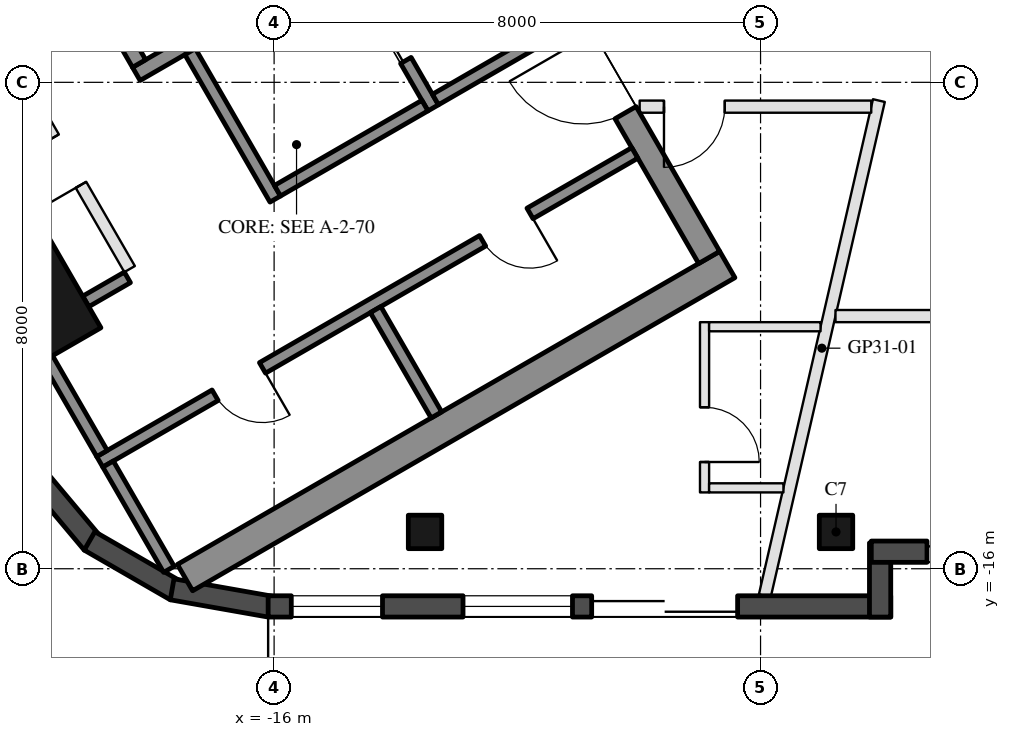
"""IFC4 building model, lengths in metres.
Left out: names, types, materials, properties, quantities, classifications, styles, units other than length and angle.
Written with IfcOpenShell. Run it as: python <this file> out.ifc"""

import sys

from ifc_helpers import new_model, si_unit, direction, frame, frame_2d, origin, origin_2d, place, context, subcontext, project, spatial, rectangle, hollow_rectangle, extrude, boolean, halfspace, element, fill, save


model = new_model("IFC4")
c1 = context("Model", 3, precision=1e-05, world=origin(), true_north=direction((0.0, 1.0)))
c2 = subcontext(c1, "Body", "Model", "MODEL_VIEW")
j1 = project(units=[si_unit("LENGTHUNIT", "METRE"), si_unit("PLANEANGLEUNIT", "RADIAN")], contexts=[c1])
p1 = place(None, origin())
s1 = spatial("IfcSite", under=j1, at=p1, CompositionType="ELEMENT")
p2 = place(p1, origin())
s2 = spatial("IfcBuilding", under=s1, at=p2, CompositionType="ELEMENT")
p3 = place(p2, frame((0.0, 0.0, 302.2)))
s3 = spatial("IfcBuildingStorey", under=s2, at=p3, CompositionType="ELEMENT", Elevation=302.2)
p4 = place(p3, frame((-13.518, -15.395, 0.0), z_axis=(0.0, 0.0, 1.0), x_axis=(-1.0, 0.0, 0.0)))
e1 = element("IfcColumn", 1, at=p4, inside=s3, PredefinedType="COLUMN", context=c2, shape_type="SweptSolid", body=[
    boolean("DIFFERENCE", extrude(hollow_rectangle(XDim=0.55, YDim=0.55, WallThickness=0.025, at=origin_2d()), origin(), (0.0, 0.0, 1.0), 3.7), halfspace(frame((0.0, 0.0, 0.04), z_axis=(0.0, 0.0, 1.0), x_axis=(1.0, 0.0, 0.0)), True)),
])
p5 = place(p3, frame((-6.759, -15.395, 0.0), z_axis=(0.0, 0.0, 1.0), x_axis=(-1.0, 0.0, 0.0)))
e2 = element("IfcColumn", 2, at=p5, inside=s3, PredefinedType="COLUMN", context=c2, shape_type="SweptSolid", body=[
    boolean("DIFFERENCE", extrude(hollow_rectangle(XDim=0.55, YDim=0.55, WallThickness=0.025, at=origin_2d()), origin(), (0.0, 0.0, 1.0), 3.7), halfspace(frame((0.0, 0.0, 0.034), z_axis=(0.0, 0.0, 1.0), x_axis=(1.0, 0.0, 0.0)), True)),
])
p6 = place(p3, frame((-20.214, -11.671, 0.0), z_axis=(0.0, 0.0, 1.0), x_axis=(-0.5, 0.866025403784, 0.0)))
e3 = element("IfcColumn", 3, at=p6, inside=s3, PredefinedType="COLUMN", context=c2, shape_type="SweptSolid", body=[
    boolean("DIFFERENCE", extrude(hollow_rectangle(XDim=2.0, YDim=2.0, WallThickness=0.05, at=origin_2d()), origin(), (0.0, 0.0, 1.0), 3.7), halfspace(frame((0.0, 0.0, 0.113), z_axis=(0.0, 0.0, 1.0), x_axis=(1.0, 0.0, 0.0)), True)),
])
p7 = place(p3, frame((-20.039, -14.329, 0.0), z_axis=(0.0, 0.0, 1.0), x_axis=(0.642708448155, -0.766110860562, 0.0)))
e4 = element("IfcWall", 4, at=p7, inside=s3, PredefinedType="SOLIDWALL", context=c2, shape_type="SweptSolid", body=[
    extrude(rectangle(XDim=1.634, YDim=0.35, at=frame_2d((0.817, 0.0))), origin(), (0.0, 0.0, 1.0), 3.55),
])
p8 = place(p3, frame((-19.035, -15.542, 0.0), z_axis=(0.0, 0.0, 1.0), x_axis=(0.866083589932, -0.499899205091, 0.0)))
e5 = element("IfcWall", 5, at=p8, inside=s3, PredefinedType="SOLIDWALL", context=c2, shape_type="SweptSolid", body=[
    extrude(rectangle(XDim=1.634, YDim=0.35, at=frame_2d((0.817, 0.0))), origin(), (0.0, 0.0, 1.0), 3.55),
])
p9 = place(p3, frame((-17.677, -16.338, 0.0), z_axis=(0.0, 0.0, 1.0), x_axis=(0.98479107762, -0.173742721977, 0.0)))
e6 = element("IfcWall", 6, at=p9, inside=s3, PredefinedType="SOLIDWALL", context=c2, shape_type="SweptSolid", body=[
    extrude(rectangle(XDim=1.634, YDim=0.35, at=frame_2d((0.817, 0.0))), origin(), (0.0, 0.0, 1.0), 3.55),
])
p10 = place(p3, frame((-16.098, -16.62, 0.0), z_axis=(0.0, 0.0, 1.0), x_axis=(1.0, 0.0, 0.0)))
e7 = element("IfcWall", 7, at=p10, inside=s3, PredefinedType="SOLIDWALL", context=c2, shape_type="SweptSolid", body=[
    extrude(rectangle(XDim=10.239, YDim=0.35, at=frame_2d((5.12, 0.0))), origin(), (0.0, 0.0, 1.0), 3.55),
])
p11 = place(p10, frame((0.381, 0.0, 0.3)))
e8 = element("IfcOpeningElement", 8, at=p11, cuts=e7, PredefinedType="OPENING", context=c2, shape_type="SweptSolid", body=[
    extrude(rectangle(XDim=1.5, YDim=2.65, at=frame_2d((0.75, 1.325))), frame((0.0, 0.185, 0.0), z_axis=(0.0, -1.0, 0.0), x_axis=(1.0, 0.0, 0.0)), (0.0, 0.0, 1.0), 0.37),
])
p12 = place(p10, frame((5.321, 0.0, 0.0)))
e9 = element("IfcOpeningElement", 9, at=p12, cuts=e7, PredefinedType="OPENING", context=c2, shape_type="SweptSolid", body=[
    extrude(rectangle(XDim=2.4, YDim=2.4, at=frame_2d((1.2, 1.2))), frame((0.0, 0.185, 0.0), z_axis=(0.0, -1.0, 0.0), x_axis=(1.0, 0.0, 0.0)), (0.0, 0.0, 1.0), 0.37),
])
p13 = place(p10, frame((3.205, 0.0, 0.3)))
e10 = element("IfcOpeningElement", 10, at=p13, cuts=e7, PredefinedType="OPENING", context=c2, shape_type="SweptSolid", body=[
    extrude(rectangle(XDim=1.8, YDim=2.65, at=frame_2d((0.9, 1.325))), frame((0.0, 0.185, 0.0), z_axis=(0.0, -1.0, 0.0), x_axis=(1.0, 0.0, 0.0)), (0.0, 0.0, 1.0), 0.37),
])
p14 = place(p3, frame((-6.034, -16.795, 0.0), z_axis=(0.0, 0.0, 1.0), x_axis=(0.0, 1.0, 0.0)))
e11 = element("IfcWall", 11, at=p14, inside=s3, PredefinedType="SOLIDWALL", context=c2, shape_type="SweptSolid", body=[
    extrude(rectangle(XDim=1.22, YDim=0.35, at=frame_2d((0.61, 0.0))), origin(), (0.0, 0.0, 1.0), 3.55),
])
p15 = place(p3, frame((-6.179, -15.719, 0.0), z_axis=(0.0, 0.0, 1.0), x_axis=(1.0, 0.0, 0.0)))
e12 = element("IfcWall", 12, at=p15, inside=s3, PredefinedType="SOLIDWALL", context=c2, shape_type="SweptSolid", body=[
    extrude(rectangle(XDim=5.599, YDim=0.35, at=frame_2d((2.799, 0.0))), origin(), (0.0, 0.0, 1.0), 3.55),
])
p16 = place(p15, frame((0.916, 0.0, 0.0)))
e13 = element("IfcOpeningElement", 13, at=p16, cuts=e12, PredefinedType="OPENING", context=c2, shape_type="SweptSolid", body=[
    extrude(rectangle(XDim=2.4, YDim=2.4, at=frame_2d((1.2, 1.2))), frame((0.0, 0.185, 0.0), z_axis=(0.0, -1.0, 0.0), x_axis=(1.0, 0.0, 0.0)), (0.0, 0.0, 1.0), 0.37),
])
p17 = place(p3, frame((-8.547, -10.997, 0.0), z_axis=(0.0, 0.0, 1.0), x_axis=(-0.866027279078, -0.499996751883, 0.0)))
e14 = element("IfcWall", 14, at=p17, inside=s3, PredefinedType="SHEAR", context=c2, shape_type="SweptSolid", body=[
    extrude(rectangle(XDim=10.298, YDim=0.5, at=frame_2d((5.149, 0.0))), origin(), (0.0, 0.0, 1.0), 3.5),
])
p18 = place(p3, frame((-13.845, -2.22, 0.0), z_axis=(0.0, 0.0, 1.0), x_axis=(0.500004234368, -0.866022959057, 0.0)))
e15 = element("IfcWall", 15, at=p18, inside=s3, PredefinedType="SHEAR", context=c2, shape_type="SweptSolid", body=[
    extrude(rectangle(XDim=10.0, YDim=0.4, at=frame_2d((5.0, 0.0))), origin(), (0.0, 0.0, 1.0), 3.5),
])
p19 = place(p18, frame((3.55, 0.0, 0.0)))
e16 = element("IfcOpeningElement", 16, at=p19, cuts=e15, PredefinedType="OPENING", context=c2, shape_type="SweptSolid", body=[
    extrude(rectangle(XDim=1.1, YDim=2.1, at=frame_2d((0.55, 1.05))), frame((0.0, 0.21, 0.0), z_axis=(0.0, -1.0, 0.0), x_axis=(1.0, 0.0, 0.0)), (0.0, 0.0, 1.0), 0.42),
])
p20 = place(p18, frame((5.85, 0.0, 0.0)))
e17 = element("IfcOpeningElement", 17, at=p20, cuts=e15, PredefinedType="OPENING", context=c2, shape_type="SweptSolid", body=[
    extrude(rectangle(XDim=1.4, YDim=2.1, at=frame_2d((0.7, 1.05))), frame((0.0, 0.21, 0.0), z_axis=(0.0, -1.0, 0.0), x_axis=(1.0, 0.0, 0.0)), (0.0, 0.0, 1.0), 0.42),
])
p21 = place(p3, frame((-12.681, -4.636, 0.0), z_axis=(0.0, 0.0, 1.0), x_axis=(-0.866021702275, -0.500006411147, 0.0)))
e18 = element("IfcWall", 18, at=p21, inside=s3, PredefinedType="SHEAR", context=c2, shape_type="SweptSolid", body=[
    extrude(rectangle(XDim=6.45, YDim=0.25, at=frame_2d((3.225, 0.0))), origin(), (0.0, 0.0, 1.0), 3.5),
])
p22 = place(p21, frame((0.3, 0.0, 0.0)))
e19 = element("IfcOpeningElement", 19, at=p22, cuts=e18, PredefinedType="OPENING", context=c2, shape_type="SweptSolid", body=[
    extrude(rectangle(XDim=1.0, YDim=2.1, at=frame_2d((0.5, 1.05))), frame((0.0, 0.135, 0.0), z_axis=(0.0, -1.0, 0.0), x_axis=(1.0, 0.0, 0.0)), (0.0, 0.0, 1.0), 0.27),
])
p23 = place(p3, frame((-19.496, -5.482, 0.0), z_axis=(0.0, 0.0, 1.0), x_axis=(0.499990435942, -0.866030925526, 0.0)))
e20 = element("IfcWall", 20, at=p23, inside=s3, PredefinedType="SHEAR", context=c2, shape_type="SweptSolid", body=[
    extrude(rectangle(XDim=2.55, YDim=0.25, at=frame_2d((1.275, 0.0))), origin(), (0.0, 0.0, 1.0), 3.5),
])
p24 = place(p3, frame((-17.381, -7.495, 0.0), z_axis=(0.0, 0.0, 1.0), x_axis=(0.500011755427, -0.866018616679, 0.0)))
e21 = element("IfcWall", 21, at=p24, inside=s3, PredefinedType="SHEAR", context=c2, shape_type="SweptSolid", body=[
    extrude(rectangle(XDim=2.8, YDim=0.2, at=frame_2d((1.4, 0.0))), origin(), (0.0, 0.0, 1.0), 3.5),
])
p25 = place(p3, frame((-14.783, -5.995, 0.0), z_axis=(0.0, 0.0, 1.0), x_axis=(0.49994636267, -0.866056369097, 0.0)))
e22 = element("IfcWall", 22, at=p25, inside=s3, PredefinedType="SHEAR", context=c2, shape_type="SweptSolid", body=[
    extrude(rectangle(XDim=2.8, YDim=0.2, at=frame_2d((1.4, 0.0))), origin(), (0.0, 0.0, 1.0), 3.5),
])
p26 = place(p25, frame((0.7, 0.0, 0.0)))
e23 = element("IfcOpeningElement", 23, at=p26, cuts=e22, PredefinedType="OPENING", context=c2, shape_type="SweptSolid", body=[
    extrude(rectangle(XDim=1.2, YDim=2.1, at=frame_2d((0.6, 1.05))), frame((0.0, 0.11, 0.0), z_axis=(0.0, -1.0, 0.0), x_axis=(1.0, 0.0, 0.0)), (0.0, 0.0, 1.0), 0.22),
])
p27 = place(p3, frame((-13.52, -8.383, 0.0), z_axis=(0.0, 0.0, 1.0), x_axis=(-0.866034573852, -0.49998411664, 0.0)))
e24 = element("IfcWall", 24, at=p27, inside=s3, PredefinedType="SHEAR", context=c2, shape_type="SweptSolid", body=[
    extrude(rectangle(XDim=2.8, YDim=0.2, at=frame_2d((1.4, 0.0))), origin(), (0.0, 0.0, 1.0), 3.5),
])
p28 = place(p3, frame((-11.268, -7.083, 0.0), z_axis=(0.0, 0.0, 1.0), x_axis=(-0.866050077142, -0.499957262057, 0.0)))
e25 = element("IfcWall", 25, at=p28, inside=s3, PredefinedType="SHEAR", context=c2, shape_type="SweptSolid", body=[
    extrude(rectangle(XDim=2.4, YDim=0.2, at=frame_2d((1.2, 0.0))), origin(), (0.0, 0.0, 1.0), 3.5),
])
p29 = place(p3, frame((-10.068, -9.162, 0.0), z_axis=(0.0, 0.0, 1.0), x_axis=(-0.866032725843, -0.499987317609, 0.0)))
e26 = element("IfcWall", 26, at=p29, inside=s3, PredefinedType="SHEAR", context=c2, shape_type="SweptSolid", body=[
    extrude(rectangle(XDim=10.16, YDim=0.2, at=frame_2d((5.08, 0.0))), origin(), (0.0, 0.0, 1.0), 3.5),
])
p30 = place(p29, frame((1.99, 0.0, 0.0)))
e27 = element("IfcOpeningElement", 27, at=p30, cuts=e26, PredefinedType="OPENING", context=c2, shape_type="SweptSolid", body=[
    extrude(rectangle(XDim=0.9, YDim=2.1, at=frame_2d((0.45, 1.05))), frame((0.0, 0.11, 0.0), z_axis=(0.0, -1.0, 0.0), x_axis=(1.0, 0.0, 0.0)), (0.0, 0.0, 1.0), 0.22),
])
p31 = place(p29, frame((7.07, 0.0, 0.0)))
e28 = element("IfcOpeningElement", 28, at=p31, cuts=e26, PredefinedType="OPENING", context=c2, shape_type="SweptSolid", body=[
    extrude(rectangle(XDim=0.9, YDim=2.1, at=frame_2d((0.45, 1.05))), frame((0.0, 0.11, 0.0), z_axis=(0.0, -1.0, 0.0), x_axis=(1.0, 0.0, 0.0)), (0.0, 0.0, 1.0), 0.22),
])
p32 = place(p3, frame((-19.73, -12.546, 0.0), z_axis=(0.0, 0.0, 1.0), x_axis=(0.500004188491, -0.866022985545, 0.0)))
e29 = element("IfcWall", 29, at=p32, inside=s3, PredefinedType="SHEAR", context=c2, shape_type="SweptSolid", body=[
    extrude(rectangle(XDim=1.8, YDim=0.2, at=frame_2d((0.9, 0.0))), origin(), (0.0, 0.0, 1.0), 3.5),
])
p33 = place(p3, frame((-18.413, -11.208, 0.0), z_axis=(0.0, 0.0, 1.0), x_axis=(-0.86597493103, -0.500087411186, 0.0)))
e30 = element("IfcWall", 30, at=p33, inside=s3, PredefinedType="SHEAR", context=c2, shape_type="SweptSolid", body=[
    extrude(rectangle(XDim=0.791, YDim=0.2, at=frame_2d((0.396, 0.0))), origin(), (0.0, 0.0, 1.0), 3.5),
])
for number, where, z_axis, x_axis in (
    (31, (-14.331, -11.738, 0.0), (0.0, 0.0, 1.0), (0.5, -0.866, 0.0)),
    (32, (-18.73, -14.278, 0.0), (0.0, 0.0, 1.0), (0.5, -0.866, 0.0)),
):
    element("IfcWall", number, at=place(p3, frame(where, z_axis=z_axis, x_axis=x_axis)), inside=s3, PredefinedType="SHEAR", context=c2, shape_type="SweptSolid", body=[
        extrude(rectangle(XDim=2.0, YDim=0.2, at=frame_2d((1.0, 0.0))), origin(), (0.0, 0.0, 1.0), 3.5),
    ])
p34 = place(p3, frame((-21.076, -6.395, 0.0), z_axis=(0.0, 0.0, 1.0), x_axis=(0.50001468107, -0.866016927499, 0.0)))
e33 = element("IfcWall", 33, at=p34, inside=s3, PredefinedType="PARTITIONING", context=c2, shape_type="SweptSolid", body=[
    extrude(rectangle(XDim=5.4, YDim=0.2, at=frame_2d((2.7, 0.0))), origin(), (0.0, 0.0, 1.0), 3.5),
])
p35 = place(p34, frame((2.9, 0.0, 0.0)))
e34 = element("IfcOpeningElement", 34, at=p35, cuts=e33, PredefinedType="OPENING", context=c2, shape_type="SweptSolid", body=[
    extrude(rectangle(XDim=0.9, YDim=2.1, at=frame_2d((0.45, 1.05))), frame((0.0, 0.11, 0.0), z_axis=(0.0, -1.0, 0.0), x_axis=(1.0, 0.0, 0.0)), (0.0, 0.0, 1.0), 0.22),
])
p36 = place(p3, frame((-18.866, -6.822, 0.0), z_axis=(0.0, 0.0, 1.0), x_axis=(-0.866028054938, -0.499995408039, 0.0)))
e35 = element("IfcWall", 35, at=p36, inside=s3, PredefinedType="PARTITIONING", context=c2, shape_type="SweptSolid", body=[
    extrude(rectangle(XDim=1.6, YDim=0.15, at=frame_2d((0.8, 0.0))), origin(), (0.0, 0.0, 1.0), 3.5),
])
p37 = place(p36, frame((0.35, 0.0, 0.0)))
e36 = element("IfcOpeningElement", 36, at=p37, cuts=e35, PredefinedType="OPENING", context=c2, shape_type="SweptSolid", body=[
    extrude(rectangle(XDim=0.9, YDim=2.1, at=frame_2d((0.45, 1.05))), frame((0.0, 0.085, 0.0), z_axis=(0.0, -1.0, 0.0), x_axis=(1.0, 0.0, 0.0)), (0.0, 0.0, 1.0), 0.17),
])
p38 = place(p3, frame((-7.93, -16.445, 0.0), z_axis=(0.0, 0.0, 1.0), x_axis=(0.224458408835, 0.974483669798, 0.0)))
e37 = element("IfcWall", 37, at=p38, inside=s3, PredefinedType="PARTITIONING", context=c2, shape_type="SweptSolid", body=[
    extrude(rectangle(XDim=8.358, YDim=0.2, at=frame_2d((4.179, 0.0))), origin(), (0.0, 0.0, 1.0), 3.1),
])
p39 = place(p3, frame((-6.18, -8.4, 0.0), z_axis=(0.0, 0.0, 1.0), x_axis=(-1.0, 0.0, 0.0)))
e38 = element("IfcWall", 38, at=p39, inside=s3, PredefinedType="PARTITIONING", context=c2, shape_type="SweptSolid", body=[
    extrude(rectangle(XDim=3.809, YDim=0.2, at=frame_2d((1.904, 0.0))), origin(), (0.0, 0.0, 1.0), 3.1),
])
p40 = place(p39, frame((2.409, 0.0, 0.0)))
e39 = element("IfcOpeningElement", 39, at=p40, cuts=e38, PredefinedType="OPENING", context=c2, shape_type="SweptSolid", body=[
    extrude(rectangle(XDim=1.0, YDim=2.1, at=frame_2d((0.5, 1.05))), frame((0.0, 0.11, 0.0), z_axis=(0.0, -1.0, 0.0), x_axis=(1.0, 0.0, 0.0)), (0.0, 0.0, 1.0), 0.22),
])
p41 = place(p3, frame((-8.921, -11.945, 0.0), z_axis=(0.0, 0.0, 1.0), x_axis=(0.0, -1.0, 0.0)))
e40 = element("IfcWall", 40, at=p41, inside=s3, PredefinedType="PARTITIONING", context=c2, shape_type="SweptSolid", body=[
    extrude(rectangle(XDim=2.8, YDim=0.15, at=frame_2d((1.4, 0.0))), origin(), (0.0, 0.0, 1.0), 3.55),
])
p42 = place(p41, frame((1.4, 0.0, 0.0)))
e41 = element("IfcOpeningElement", 41, at=p42, cuts=e40, PredefinedType="OPENING", context=c2, shape_type="SweptSolid", body=[
    extrude(rectangle(XDim=0.9, YDim=2.1, at=frame_2d((0.45, 1.05))), frame((0.0, 0.085, 0.0), z_axis=(0.0, -1.0, 0.0), x_axis=(1.0, 0.0, 0.0)), (0.0, 0.0, 1.0), 0.17),
])
p43 = place(p3, frame((-8.846, -14.67, 0.0), z_axis=(0.0, 0.0, 1.0), x_axis=(1.0, 0.0, 0.0)))
e42 = element("IfcWall", 42, at=p43, inside=s3, PredefinedType="PARTITIONING", context=c2, shape_type="SweptSolid", body=[
    extrude(rectangle(XDim=1.222, YDim=0.15, at=frame_2d((0.611, 0.0))), origin(), (0.0, 0.0, 1.0), 3.55),
])
p44 = place(p3, frame((-8.846, -12.02, 0.0), z_axis=(0.0, 0.0, 1.0), x_axis=(1.0, 0.0, 0.0)))
e43 = element("IfcWall", 43, at=p44, inside=s3, PredefinedType="PARTITIONING", context=c2, shape_type="SweptSolid", body=[
    extrude(rectangle(XDim=1.833, YDim=0.15, at=frame_2d((0.917, 0.0))), origin(), (0.0, 0.0, 1.0), 3.55),
])
p45 = place(p3, frame((-2.226, -11.844, 0.0), z_axis=(0.0, 0.0, 1.0), x_axis=(-1.0, 0.0, 0.0)))
e44 = element("IfcWall", 44, at=p45, inside=s3, PredefinedType="PARTITIONING", context=c2, shape_type="SweptSolid", body=[
    extrude(rectangle(XDim=4.542, YDim=0.2, at=frame_2d((2.271, 0.0))), origin(), (0.0, 0.0, 1.0), 3.1),
])
p46 = place(p45, frame((1.771, 0.0, 0.0)))
e45 = element("IfcOpeningElement", 45, at=p46, cuts=e44, PredefinedType="OPENING", context=c2, shape_type="SweptSolid", body=[
    extrude(rectangle(XDim=1.0, YDim=2.1, at=frame_2d((0.5, 1.05))), frame((0.0, 0.11, 0.0), z_axis=(0.0, -1.0, 0.0), x_axis=(1.0, 0.0, 0.0)), (0.0, 0.0, 1.0), 0.22),
])
p47 = place(p11, origin())
e46 = element("IfcWindow", 46, at=p47, inside=s3, PartitioningType="SINGLE_PANEL", PredefinedType="WINDOW", context=c2, shape_type="SweptSolid", body=[
    extrude(rectangle(XDim=1.5, YDim=2.65, at=frame_2d((0.75, 1.325))), frame((0.0, 0.03, 0.0), z_axis=(0.0, -1.0, 0.0), x_axis=(1.0, 0.0, 0.0)), (0.0, 0.0, 1.0), 0.06),
])
fill(e8, e46)
p48 = place(p12, frame((2.4, 0.0, 0.0), z_axis=(0.0, 0.0, 1.0), x_axis=(-1.0, 0.0, 0.0)))
e47 = element("IfcDoor", 47, at=p48, inside=s3, OperationType="SLIDING_TO_LEFT", PredefinedType="DOOR", context=c2, shape_type="SweptSolid", body=[
    extrude(rectangle(XDim=2.4, YDim=2.4, at=frame_2d((1.2, 1.2))), frame((0.0, 0.025, 0.0), z_axis=(0.0, -1.0, 0.0), x_axis=(1.0, 0.0, 0.0)), (0.0, 0.0, 1.0), 0.05),
])
fill(e9, e47)
p49 = place(p13, origin())
e48 = element("IfcWindow", 48, at=p49, inside=s3, PartitioningType="SINGLE_PANEL", PredefinedType="WINDOW", context=c2, shape_type="SweptSolid", body=[
    extrude(rectangle(XDim=1.8, YDim=2.65, at=frame_2d((0.9, 1.325))), frame((0.0, 0.03, 0.0), z_axis=(0.0, -1.0, 0.0), x_axis=(1.0, 0.0, 0.0)), (0.0, 0.0, 1.0), 0.06),
])
fill(e10, e48)
p50 = place(p16, frame((2.4, 0.0, 0.0), z_axis=(0.0, 0.0, 1.0), x_axis=(-1.0, 0.0, 0.0)))
e49 = element("IfcDoor", 49, at=p50, inside=s3, OperationType="SLIDING_TO_LEFT", PredefinedType="DOOR", context=c2, shape_type="SweptSolid", body=[
    extrude(rectangle(XDim=2.4, YDim=2.4, at=frame_2d((1.2, 1.2))), frame((0.0, 0.025, 0.0), z_axis=(0.0, -1.0, 0.0), x_axis=(1.0, 0.0, 0.0)), (0.0, 0.0, 1.0), 0.05),
])
fill(e13, e49)
p51 = place(p26, origin())
e50 = element("IfcDoor", 50, at=p51, inside=s3, OperationType="DOUBLE_DOOR_SLIDING", PredefinedType="DOOR", context=c2, shape_type="SweptSolid", body=[
    extrude(rectangle(XDim=1.2, YDim=2.1, at=frame_2d((0.6, 1.05))), frame((0.0, 0.025, 0.0), z_axis=(0.0, -1.0, 0.0), x_axis=(1.0, 0.0, 0.0)), (0.0, 0.0, 1.0), 0.05),
])
fill(e23, e50)
p52 = place(p30, origin())
e51 = element("IfcDoor", 51, at=p52, inside=s3, OperationType="SINGLE_SWING_LEFT", PredefinedType="DOOR", context=c2, shape_type="SweptSolid", body=[
    extrude(rectangle(XDim=0.9, YDim=2.1, at=frame_2d((0.45, 1.05))), frame((0.0, 0.025, 0.0), z_axis=(0.0, -1.0, 0.0), x_axis=(1.0, 0.0, 0.0)), (0.0, 0.0, 1.0), 0.05),
])
fill(e27, e51)
p53 = place(p31, origin())
e52 = element("IfcDoor", 52, at=p53, inside=s3, OperationType="SINGLE_SWING_LEFT", PredefinedType="DOOR", context=c2, shape_type="SweptSolid", body=[
    extrude(rectangle(XDim=0.9, YDim=2.1, at=frame_2d((0.45, 1.05))), frame((0.0, 0.025, 0.0), z_axis=(0.0, -1.0, 0.0), x_axis=(1.0, 0.0, 0.0)), (0.0, 0.0, 1.0), 0.05),
])
fill(e28, e52)
p54 = place(p35, frame((0.9, 0.0, 0.0), z_axis=(0.0, 0.0, 1.0), x_axis=(-1.0, 0.0, 0.0)))
e53 = element("IfcDoor", 53, at=p54, inside=s3, OperationType="SINGLE_SWING_LEFT", PredefinedType="DOOR", context=c2, shape_type="SweptSolid", body=[
    extrude(rectangle(XDim=0.9, YDim=2.1, at=frame_2d((0.45, 1.05))), frame((0.0, 0.025, 0.0), z_axis=(0.0, -1.0, 0.0), x_axis=(1.0, 0.0, 0.0)), (0.0, 0.0, 1.0), 0.05),
])
fill(e34, e53)
p55 = place(p20, frame((1.4, 0.0, 0.0), z_axis=(0.0, 0.0, 1.0), x_axis=(-1.0, 0.0, 0.0)))
e54 = element("IfcDoor", 54, at=p55, inside=s3, OperationType="DOUBLE_DOOR_SINGLE_SWING", PredefinedType="DOOR", context=c2, shape_type="SweptSolid", body=[
    extrude(rectangle(XDim=1.4, YDim=2.1, at=frame_2d((0.7, 1.05))), frame((0.0, 0.025, 0.0), z_axis=(0.0, -1.0, 0.0), x_axis=(1.0, 0.0, 0.0)), (0.0, 0.0, 1.0), 0.05),
])
fill(e17, e54)
p56 = place(p42, origin())
e55 = element("IfcDoor", 55, at=p56, inside=s3, OperationType="SINGLE_SWING_RIGHT", PredefinedType="DOOR", context=c2, shape_type="SweptSolid", body=[
    extrude(rectangle(XDim=0.9, YDim=2.1, at=frame_2d((0.45, 1.05))), frame((0.0, 0.025, 0.0), z_axis=(0.0, -1.0, 0.0), x_axis=(1.0, 0.0, 0.0)), (0.0, 0.0, 1.0), 0.05),
])
fill(e41, e55)
p57 = place(p40, origin())
e56 = element("IfcDoor", 56, at=p57, inside=s3, OperationType="SINGLE_SWING_RIGHT", PredefinedType="DOOR", context=c2, shape_type="SweptSolid", body=[
    extrude(rectangle(XDim=1.0, YDim=2.1, at=frame_2d((0.5, 1.05))), frame((0.0, 0.025, 0.0), z_axis=(0.0, -1.0, 0.0), x_axis=(1.0, 0.0, 0.0)), (0.0, 0.0, 1.0), 0.05),
])
fill(e39, e56)
save(model, sys.argv[1])
